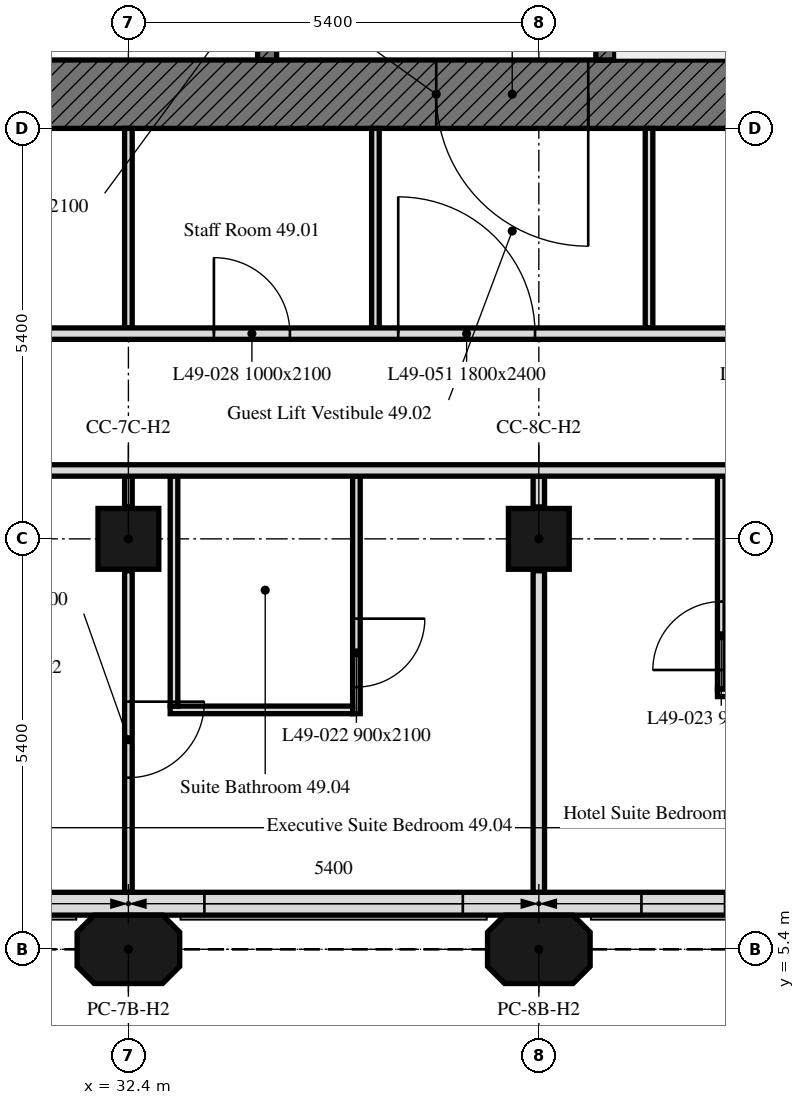
"""IFC4 building model, lengths in metres.
Left out: names, types, materials, properties, quantities, classifications, styles, units other than length and angle.
Written with IfcOpenShell. Run it as: python <this file> out.ifc"""

import sys

from ifc_helpers import new_model, si_unit, direction, frame, frame_2d, origin, origin_2d, place, context, subcontext, project, spatial, polyline, rectangle, outline, extrude, element, fill, save


model = new_model("IFC4")
c1 = context("Model", 3, precision=1e-05, world=origin(), true_north=direction((0.0, 1.0)))
c2 = subcontext(c1, "Body", "Model", "MODEL_VIEW")
j1 = project(units=[si_unit("LENGTHUNIT", "METRE"), si_unit("PLANEANGLEUNIT", "RADIAN")], contexts=[c1])
p1 = place(None, origin())
s1 = spatial("IfcSite", under=j1, at=p1, CompositionType="ELEMENT")
p2 = place(p1, origin())
s2 = spatial("IfcBuilding", under=s1, at=p2, CompositionType="ELEMENT")
p3 = place(p2, frame((0.0, 0.0, 200.5)))
s3 = spatial("IfcBuildingStorey", under=s2, at=p3, CompositionType="ELEMENT", Elevation=200.5)
for number, where, z_axis, x_axis in (
    (1, (32.4, 5.4, 0.0), (0.0, 0.0, 1.0), (1.0, 0.0, 0.0)),
    (2, (37.8, 5.4, 0.0), (0.0, 0.0, 1.0), (1.0, 0.0, 0.0)),
):
    element("IfcColumn", number, at=place(p3, frame(where, z_axis=z_axis, x_axis=x_axis)), inside=s3, PredefinedType="COLUMN", context=c2, shape_type="SweptSolid", body=[
        extrude(outline(polyline([(-0.45, -0.45), (0.45, -0.45), (0.675, -0.225), (0.675, 0.225), (0.45, 0.45), (-0.45, 0.45), (-0.675, 0.225), (-0.675, -0.225), (-0.45, -0.45)])), origin(), (0.0, 0.0, 1.0), 3.0),
    ])
for number, where, z_axis, x_axis in (
    (3, (32.4, 10.8, 0.0), (0.0, 0.0, 1.0), (1.0, 0.0, 0.0)),
    (4, (37.8, 10.8, 0.0), (0.0, 0.0, 1.0), (1.0, 0.0, 0.0)),
):
    element("IfcColumn", number, at=place(p3, frame(where, z_axis=z_axis, x_axis=x_axis)), inside=s3, PredefinedType="COLUMN", context=c2, shape_type="SweptSolid", body=[
        extrude(rectangle(XDim=0.8, YDim=0.8, at=origin_2d()), origin(), (0.0, 0.0, 1.0), 3.0),
    ])
p4 = place(p3, frame((10.986, 6.0, 0.0), z_axis=(0.0, 0.0, 1.0), x_axis=(1.0, 0.0, 0.0)))
e5 = element("IfcWall", 5, at=p4, inside=s3, PredefinedType="SOLIDWALL", context=c2, shape_type="SweptSolid", body=[
    extrude(rectangle(XDim=32.027, YDim=0.3, at=frame_2d((16.014, 0.0))), origin(), (0.0, 0.0, 1.0), 3.0),
])
p5 = place(p4, frame((0.814, 0.0, 0.9)))
e6 = element("IfcOpeningElement", 6, at=p5, cuts=e5, PredefinedType="OPENING", context=c2, shape_type="SweptSolid", body=[
    extrude(rectangle(XDim=3.4, YDim=1.7, at=frame_2d((1.7, 0.85))), frame((0.0, 0.16, 0.0), z_axis=(0.0, -1.0, 0.0), x_axis=(1.0, 0.0, 0.0)), (0.0, 0.0, 1.0), 0.32),
])
p6 = place(p4, frame((6.564, 0.0, 0.9)))
e7 = element("IfcOpeningElement", 7, at=p6, cuts=e5, PredefinedType="OPENING", context=c2, shape_type="SweptSolid", body=[
    extrude(rectangle(XDim=1.1, YDim=1.7, at=frame_2d((0.55, 0.85))), frame((0.0, 0.16, 0.0), z_axis=(0.0, -1.0, 0.0), x_axis=(1.0, 0.0, 0.0)), (0.0, 0.0, 1.0), 0.32),
])
p7 = place(p4, frame((11.614, 0.0, 0.9)))
e8 = element("IfcOpeningElement", 8, at=p7, cuts=e5, PredefinedType="OPENING", context=c2, shape_type="SweptSolid", body=[
    extrude(rectangle(XDim=3.4, YDim=1.7, at=frame_2d((1.7, 0.85))), frame((0.0, 0.16, 0.0), z_axis=(0.0, -1.0, 0.0), x_axis=(1.0, 0.0, 0.0)), (0.0, 0.0, 1.0), 0.32),
])
p8 = place(p4, frame((17.364, 0.0, 0.9)))
e9 = element("IfcOpeningElement", 9, at=p8, cuts=e5, PredefinedType="OPENING", context=c2, shape_type="SweptSolid", body=[
    extrude(rectangle(XDim=1.1, YDim=1.7, at=frame_2d((0.55, 0.85))), frame((0.0, 0.16, 0.0), z_axis=(0.0, -1.0, 0.0), x_axis=(1.0, 0.0, 0.0)), (0.0, 0.0, 1.0), 0.32),
])
p9 = place(p4, frame((22.414, 0.0, 0.9)))
e10 = element("IfcOpeningElement", 10, at=p9, cuts=e5, PredefinedType="OPENING", context=c2, shape_type="SweptSolid", body=[
    extrude(rectangle(XDim=3.4, YDim=1.7, at=frame_2d((1.7, 0.85))), frame((0.0, 0.16, 0.0), z_axis=(0.0, -1.0, 0.0), x_axis=(1.0, 0.0, 0.0)), (0.0, 0.0, 1.0), 0.32),
])
p10 = place(p4, frame((28.164, 0.0, 0.9)))
e11 = element("IfcOpeningElement", 11, at=p10, cuts=e5, PredefinedType="OPENING", context=c2, shape_type="SweptSolid", body=[
    extrude(rectangle(XDim=1.1, YDim=1.7, at=frame_2d((0.55, 0.85))), frame((0.0, 0.16, 0.0), z_axis=(0.0, -1.0, 0.0), x_axis=(1.0, 0.0, 0.0)), (0.0, 0.0, 1.0), 0.32),
])
p11 = place(p3, frame((42.0, 16.65, 0.0), z_axis=(0.0, 0.0, 1.0), x_axis=(-1.0, 0.0, 0.0)))
e12 = element("IfcWall", 12, at=p11, inside=s3, PredefinedType="SOLIDWALL", context=c2, shape_type="SweptSolid", body=[
    extrude(rectangle(XDim=11.1, YDim=0.9, at=frame_2d((5.55, 0.0))), origin(), (0.0, 0.0, 1.0), 3.0),
])
p12 = place(p11, frame((3.55, 0.0, 0.0)))
e13 = element("IfcOpeningElement", 13, at=p12, cuts=e12, PredefinedType="OPENING", context=c2, shape_type="SweptSolid", body=[
    extrude(rectangle(XDim=2.0, YDim=2.4, at=frame_2d((1.0, 1.2))), frame((0.0, 0.45, 0.0), z_axis=(0.0, -1.0, 0.0), x_axis=(1.0, 0.0, 0.0)), (0.0, 0.0, 1.0), 0.9),
])
p13 = place(p3, frame((38.675, 17.1, 0.0), z_axis=(0.0, 0.0, 1.0), x_axis=(0.0, 1.0, 0.0)))
e14 = element("IfcWall", 14, at=p13, inside=s3, PredefinedType="SOLIDWALL", context=c2, shape_type="SweptSolid", body=[
    extrude(rectangle(XDim=14.4, YDim=0.25, at=frame_2d((7.2, 0.0))), origin(), (0.0, 0.0, 1.0), 3.0),
])
p14 = place(p13, frame((4.6, 0.0, 0.0)))
e15 = element("IfcOpeningElement", 15, at=p14, cuts=e14, PredefinedType="OPENING", context=c2, shape_type="SweptSolid", body=[
    extrude(rectangle(XDim=1.0, YDim=2.1, at=frame_2d((0.5, 1.05))), frame((0.0, 0.125, 0.0), z_axis=(0.0, -1.0, 0.0), x_axis=(1.0, 0.0, 0.0)), (0.0, 0.0, 1.0), 0.25),
])
p15 = place(p13, frame((7.062, 0.0, 0.0)))
e16 = element("IfcOpeningElement", 16, at=p15, cuts=e14, PredefinedType="OPENING", context=c2, shape_type="SweptSolid", body=[
    extrude(rectangle(XDim=1.2, YDim=2.1, at=frame_2d((0.6, 1.05))), frame((0.0, 0.125, 0.0), z_axis=(0.0, -1.0, 0.0), x_axis=(1.0, 0.0, 0.0)), (0.0, 0.0, 1.0), 0.25),
])
p16 = place(p13, frame((9.472, 0.0, 0.0)))
e17 = element("IfcOpeningElement", 17, at=p16, cuts=e14, PredefinedType="OPENING", context=c2, shape_type="SweptSolid", body=[
    extrude(rectangle(XDim=0.9, YDim=2.1, at=frame_2d((0.45, 1.05))), frame((0.0, 0.125, 0.0), z_axis=(0.0, -1.0, 0.0), x_axis=(1.0, 0.0, 0.0)), (0.0, 0.0, 1.0), 0.25),
])
p17 = place(p13, frame((11.159, 0.0, 0.0)))
e18 = element("IfcOpeningElement", 18, at=p17, cuts=e14, PredefinedType="OPENING", context=c2, shape_type="SweptSolid", body=[
    extrude(rectangle(XDim=0.9, YDim=2.1, at=frame_2d((0.45, 1.05))), frame((0.0, 0.125, 0.0), z_axis=(0.0, -1.0, 0.0), x_axis=(1.0, 0.0, 0.0)), (0.0, 0.0, 1.0), 0.25),
])
p18 = place(p13, frame((13.1, 0.0, 0.0)))
e19 = element("IfcOpeningElement", 19, at=p18, cuts=e14, PredefinedType="OPENING", context=c2, shape_type="SweptSolid", body=[
    extrude(rectangle(XDim=0.9, YDim=2.1, at=frame_2d((0.45, 1.05))), frame((0.0, 0.125, 0.0), z_axis=(0.0, -1.0, 0.0), x_axis=(1.0, 0.0, 0.0)), (0.0, 0.0, 1.0), 0.25),
])
p19 = place(p3, frame((34.225, 17.1, 0.0), z_axis=(0.0, 0.0, 1.0), x_axis=(0.0, 1.0, 0.0)))
e20 = element("IfcWall", 20, at=p19, inside=s3, PredefinedType="SOLIDWALL", context=c2, shape_type="SweptSolid", body=[
    extrude(rectangle(XDim=14.4, YDim=0.25, at=frame_2d((7.2, 0.0))), origin(), (0.0, 0.0, 1.0), 3.0),
])
p20 = place(p19, frame((13.15, 0.0, 0.0)))
e21 = element("IfcOpeningElement", 21, at=p20, cuts=e20, PredefinedType="OPENING", context=c2, shape_type="SweptSolid", body=[
    extrude(rectangle(XDim=1.0, YDim=2.1, at=frame_2d((0.5, 1.05))), frame((0.0, 0.125, 0.0), z_axis=(0.0, -1.0, 0.0), x_axis=(1.0, 0.0, 0.0)), (0.0, 0.0, 1.0), 0.25),
])
p21 = place(p19, frame((0.6, 0.0, 0.0)))
e22 = element("IfcOpeningElement", 22, at=p21, cuts=e20, PredefinedType="OPENING", context=c2, shape_type="SweptSolid", body=[
    extrude(rectangle(XDim=1.1, YDim=2.1, at=frame_2d((0.55, 1.05))), frame((0.0, 0.125, 0.0), z_axis=(0.0, -1.0, 0.0), x_axis=(1.0, 0.0, 0.0)), (0.0, 0.0, 1.0), 0.25),
])
p22 = place(p19, frame((3.25, 0.0, 0.0)))
e23 = element("IfcOpeningElement", 23, at=p22, cuts=e20, PredefinedType="OPENING", context=c2, shape_type="SweptSolid", body=[
    extrude(rectangle(XDim=0.9, YDim=2.1, at=frame_2d((0.45, 1.05))), frame((0.0, 0.125, 0.0), z_axis=(0.0, -1.0, 0.0), x_axis=(1.0, 0.0, 0.0)), (0.0, 0.0, 1.0), 0.25),
])
p23 = place(p3, frame((37.8, 6.151, 0.0), z_axis=(0.0, 0.0, 1.0), x_axis=(0.0, 1.0, 0.0)))
e24 = element("IfcWall", 24, at=p23, inside=s3, PredefinedType="PARTITIONING", context=c2, shape_type="SweptSolid", body=[
    extrude(rectangle(XDim=4.229, YDim=0.15, at=frame_2d((2.115, 0.0))), origin(), (0.0, 0.0, 1.0), 3.0),
])
p24 = place(p3, frame((37.8, 11.22, 0.0), z_axis=(0.0, 0.0, 1.0), x_axis=(0.0, 1.0, 0.0)))
e25 = element("IfcWall", 25, at=p24, inside=s3, PredefinedType="PARTITIONING", context=c2, shape_type="SweptSolid", body=[
    extrude(rectangle(XDim=0.405, YDim=0.15, at=frame_2d((0.203, 0.0))), origin(), (0.0, 0.0, 1.0), 3.0),
])
p25 = place(p3, frame((35.4, 11.625, 0.0), z_axis=(0.0, 0.0, 1.0), x_axis=(0.0, -1.0, 0.0)))
e26 = element("IfcWall", 26, at=p25, inside=s3, PredefinedType="PARTITIONING", context=c2, shape_type="SweptSolid", body=[
    extrude(rectangle(XDim=3.125, YDim=0.1, at=frame_2d((1.562, 0.0))), origin(), (0.0, 0.0, 1.0), 3.0),
])
p26 = place(p25, frame((1.875, 0.0, 0.0)))
e27 = element("IfcOpeningElement", 27, at=p26, cuts=e26, PredefinedType="OPENING", context=c2, shape_type="SweptSolid", body=[
    extrude(rectangle(XDim=0.9, YDim=2.1, at=frame_2d((0.45, 1.05))), frame((0.0, 0.05, 0.0), z_axis=(0.0, -1.0, 0.0), x_axis=(1.0, 0.0, 0.0)), (0.0, 0.0, 1.0), 0.1),
])
p27 = place(p3, frame((35.35, 8.55, 0.0), z_axis=(0.0, 0.0, 1.0), x_axis=(-1.0, 0.0, 0.0)))
e28 = element("IfcWall", 28, at=p27, inside=s3, PredefinedType="PARTITIONING", context=c2, shape_type="SweptSolid", body=[
    extrude(rectangle(XDim=2.4, YDim=0.1, at=frame_2d((1.2, 0.0))), origin(), (0.0, 0.0, 1.0), 3.0),
])
p28 = place(p3, frame((33.0, 8.6, 0.0), z_axis=(0.0, 0.0, 1.0), x_axis=(0.0, 1.0, 0.0)))
e29 = element("IfcWall", 29, at=p28, inside=s3, PredefinedType="PARTITIONING", context=c2, shape_type="SweptSolid", body=[
    extrude(rectangle(XDim=3.025, YDim=0.1, at=frame_2d((1.512, 0.0))), origin(), (0.0, 0.0, 1.0), 3.0),
])
p29 = place(p3, frame((32.4, 11.625, 0.0), z_axis=(0.0, 0.0, 1.0), x_axis=(0.0, -1.0, 0.0)))
e30 = element("IfcWall", 30, at=p29, inside=s3, PredefinedType="PARTITIONING", context=c2, shape_type="SweptSolid", body=[
    extrude(rectangle(XDim=0.405, YDim=0.1, at=frame_2d((0.203, 0.0))), origin(), (0.0, 0.0, 1.0), 3.0),
])
p30 = place(p3, frame((32.4, 10.38, 0.0), z_axis=(0.0, 0.0, 1.0), x_axis=(0.0, -1.0, 0.0)))
e31 = element("IfcWall", 31, at=p30, inside=s3, PredefinedType="PARTITIONING", context=c2, shape_type="SweptSolid", body=[
    extrude(rectangle(XDim=4.229, YDim=0.1, at=frame_2d((2.115, 0.0))), origin(), (0.0, 0.0, 1.0), 3.0),
])
p31 = place(p30, frame((1.722, 0.0, 0.0)))
e32 = element("IfcOpeningElement", 32, at=p31, cuts=e31, PredefinedType="OPENING", context=c2, shape_type="SweptSolid", body=[
    extrude(rectangle(XDim=1.0, YDim=2.1, at=frame_2d((0.5, 1.05))), frame((0.0, 0.05, 0.0), z_axis=(0.0, -1.0, 0.0), x_axis=(1.0, 0.0, 0.0)), (0.0, 0.0, 1.0), 0.1),
])
p32 = place(p3, frame((42.55, 8.775, 0.0), z_axis=(0.0, 0.0, 1.0), x_axis=(-1.0, 0.0, 0.0)))
e33 = element("IfcWall", 33, at=p32, inside=s3, PredefinedType="PARTITIONING", context=c2, shape_type="SweptSolid", body=[
    extrude(rectangle(XDim=2.4, YDim=0.1, at=frame_2d((1.2, 0.0))), origin(), (0.0, 0.0, 1.0), 3.0),
])
p33 = place(p3, frame((40.2, 8.825, 0.0), z_axis=(0.0, 0.0, 1.0), x_axis=(0.0, 1.0, 0.0)))
e34 = element("IfcWall", 34, at=p33, inside=s3, PredefinedType="PARTITIONING", context=c2, shape_type="SweptSolid", body=[
    extrude(rectangle(XDim=2.8, YDim=0.1, at=frame_2d((1.4, 0.0))), origin(), (0.0, 0.0, 1.0), 3.0),
])
p34 = place(p33, frame((0.25, 0.0, 0.0)))
e35 = element("IfcOpeningElement", 35, at=p34, cuts=e34, PredefinedType="OPENING", context=c2, shape_type="SweptSolid", body=[
    extrude(rectangle(XDim=0.9, YDim=2.1, at=frame_2d((0.45, 1.05))), frame((0.0, 0.05, 0.0), z_axis=(0.0, -1.0, 0.0), x_axis=(1.0, 0.0, 0.0)), (0.0, 0.0, 1.0), 0.1),
])
p35 = place(p3, frame((6.151, 11.7, 0.0), z_axis=(0.0, 0.0, 1.0), x_axis=(1.0, 0.0, 0.0)))
e36 = element("IfcWall", 36, at=p35, inside=s3, PredefinedType="PARTITIONING", context=c2, shape_type="SweptSolid", body=[
    extrude(rectangle(XDim=41.698, YDim=0.15, at=frame_2d((20.849, 0.0))), origin(), (0.0, 0.0, 1.0), 3.0),
])
p36 = place(p35, frame((37.954, 0.0, 0.0)))
e37 = element("IfcOpeningElement", 37, at=p36, cuts=e36, PredefinedType="OPENING", context=c2, shape_type="SweptSolid", body=[
    extrude(rectangle(XDim=1.0, YDim=2.1, at=frame_2d((0.5, 1.05))), frame((0.0, 0.075, 0.0), z_axis=(0.0, -1.0, 0.0), x_axis=(1.0, 0.0, 0.0)), (0.0, 0.0, 1.0), 0.15),
])
p37 = place(p35, frame((6.849, 0.0, 0.0)))
e38 = element("IfcOpeningElement", 38, at=p37, cuts=e36, PredefinedType="OPENING", context=c2, shape_type="SweptSolid", body=[
    extrude(rectangle(XDim=1.0, YDim=2.1, at=frame_2d((0.5, 1.05))), frame((0.0, 0.075, 0.0), z_axis=(0.0, -1.0, 0.0), x_axis=(1.0, 0.0, 0.0)), (0.0, 0.0, 1.0), 0.15),
])
p38 = place(p35, frame((23.049, 0.0, 0.0)))
e39 = element("IfcOpeningElement", 39, at=p38, cuts=e36, PredefinedType="OPENING", context=c2, shape_type="SweptSolid", body=[
    extrude(rectangle(XDim=1.0, YDim=2.1, at=frame_2d((0.5, 1.05))), frame((0.0, 0.075, 0.0), z_axis=(0.0, -1.0, 0.0), x_axis=(1.0, 0.0, 0.0)), (0.0, 0.0, 1.0), 0.15),
])
for number, where, z_axis, x_axis in (
    (40, (32.4, 13.575, 0.0), (0.0, 0.0, 1.0), (0.0, 1.0, 0.0)),
    (41, (35.65, 16.2, 0.0), (0.0, 0.0, 1.0), (0.0, -1.0, 0.0)),
    (42, (39.25, 13.575, 0.0), (0.0, 0.0, 1.0), (0.0, 1.0, 0.0)),
):
    element("IfcWall", number, at=place(p3, frame(where, z_axis=z_axis, x_axis=x_axis)), inside=s3, PredefinedType="PARTITIONING", context=c2, shape_type="SweptSolid", body=[
        extrude(rectangle(XDim=2.625, YDim=0.1, at=frame_2d((1.312, 0.0))), origin(), (0.0, 0.0, 1.0), 3.0),
    ])
p39 = place(p3, frame((6.151, 13.5, 0.0), z_axis=(0.0, 0.0, 1.0), x_axis=(1.0, 0.0, 0.0)))
e43 = element("IfcWall", 43, at=p39, inside=s3, PredefinedType="PARTITIONING", context=c2, shape_type="SweptSolid", body=[
    extrude(rectangle(XDim=36.974, YDim=0.15, at=frame_2d((18.487, 0.0))), origin(), (0.0, 0.0, 1.0), 3.0),
])
p40 = place(p39, frame((12.249, 0.0, 0.0)))
e44 = element("IfcOpeningElement", 44, at=p40, cuts=e43, PredefinedType="OPENING", context=c2, shape_type="SweptSolid", body=[
    extrude(rectangle(XDim=1.0, YDim=2.1, at=frame_2d((0.5, 1.05))), frame((0.0, 0.075, 0.0), z_axis=(0.0, -1.0, 0.0), x_axis=(1.0, 0.0, 0.0)), (0.0, 0.0, 1.0), 0.15),
])
p41 = place(p39, frame((18.816, 0.0, 0.0)))
e45 = element("IfcOpeningElement", 45, at=p41, cuts=e43, PredefinedType="OPENING", context=c2, shape_type="SweptSolid", body=[
    extrude(rectangle(XDim=1.0, YDim=2.1, at=frame_2d((0.5, 1.05))), frame((0.0, 0.075, 0.0), z_axis=(0.0, -1.0, 0.0), x_axis=(1.0, 0.0, 0.0)), (0.0, 0.0, 1.0), 0.15),
])
p42 = place(p39, frame((2.029, 0.0, 0.0)))
e46 = element("IfcOpeningElement", 46, at=p42, cuts=e43, PredefinedType="OPENING", context=c2, shape_type="SweptSolid", body=[
    extrude(rectangle(XDim=1.0, YDim=2.1, at=frame_2d((0.5, 1.05))), frame((0.0, 0.075, 0.0), z_axis=(0.0, -1.0, 0.0), x_axis=(1.0, 0.0, 0.0)), (0.0, 0.0, 1.0), 0.15),
])
p43 = place(p39, frame((27.374, 0.0, 0.0)))
e47 = element("IfcOpeningElement", 47, at=p43, cuts=e43, PredefinedType="OPENING", context=c2, shape_type="SweptSolid", body=[
    extrude(rectangle(XDim=1.0, YDim=2.1, at=frame_2d((0.5, 1.05))), frame((0.0, 0.075, 0.0), z_axis=(0.0, -1.0, 0.0), x_axis=(1.0, 0.0, 0.0)), (0.0, 0.0, 1.0), 0.15),
])
p44 = place(p39, frame((34.574, 0.0, 0.0)))
e48 = element("IfcOpeningElement", 48, at=p44, cuts=e43, PredefinedType="OPENING", context=c2, shape_type="SweptSolid", body=[
    extrude(rectangle(XDim=1.0, YDim=2.1, at=frame_2d((0.5, 1.05))), frame((0.0, 0.075, 0.0), z_axis=(0.0, -1.0, 0.0), x_axis=(1.0, 0.0, 0.0)), (0.0, 0.0, 1.0), 0.15),
])
p45 = place(p39, frame((7.924, 0.0, 0.0)))
e49 = element("IfcOpeningElement", 49, at=p45, cuts=e43, PredefinedType="OPENING", context=c2, shape_type="SweptSolid", body=[
    extrude(rectangle(XDim=1.0, YDim=2.1, at=frame_2d((0.5, 1.05))), frame((0.0, 0.075, 0.0), z_axis=(0.0, -1.0, 0.0), x_axis=(1.0, 0.0, 0.0)), (0.0, 0.0, 1.0), 0.15),
])
p46 = place(p39, frame((4.699, 0.0, 0.0)))
e50 = element("IfcOpeningElement", 50, at=p46, cuts=e43, PredefinedType="OPENING", context=c2, shape_type="SweptSolid", body=[
    extrude(rectangle(XDim=1.8, YDim=2.4, at=frame_2d((0.9, 1.2))), frame((0.0, 0.075, 0.0), z_axis=(0.0, -1.0, 0.0), x_axis=(1.0, 0.0, 0.0)), (0.0, 0.0, 1.0), 0.15),
])
p47 = place(p39, frame((29.799, 0.0, 0.0)))
e51 = element("IfcOpeningElement", 51, at=p47, cuts=e43, PredefinedType="OPENING", context=c2, shape_type="SweptSolid", body=[
    extrude(rectangle(XDim=1.8, YDim=2.4, at=frame_2d((0.9, 1.2))), frame((0.0, 0.075, 0.0), z_axis=(0.0, -1.0, 0.0), x_axis=(1.0, 0.0, 0.0)), (0.0, 0.0, 1.0), 0.15),
])
p48 = place(p9, origin())
e52 = element("IfcWindow", 52, at=p48, inside=s3, PartitioningType="SINGLE_PANEL", PredefinedType="WINDOW", context=c2, shape_type="SweptSolid", body=[
    extrude(rectangle(XDim=3.4, YDim=1.7, at=frame_2d((1.7, 0.85))), frame((0.0, 0.03, 0.0), z_axis=(0.0, -1.0, 0.0), x_axis=(1.0, 0.0, 0.0)), (0.0, 0.0, 1.0), 0.06),
])
fill(e10, e52)
p49 = place(p10, origin())
e53 = element("IfcWindow", 53, at=p49, inside=s3, PartitioningType="SINGLE_PANEL", PredefinedType="WINDOW", context=c2, shape_type="SweptSolid", body=[
    extrude(rectangle(XDim=1.1, YDim=1.7, at=frame_2d((0.55, 0.85))), frame((0.0, 0.03, 0.0), z_axis=(0.0, -1.0, 0.0), x_axis=(1.0, 0.0, 0.0)), (0.0, 0.0, 1.0), 0.06),
])
fill(e11, e53)
p50 = place(p12, origin())
e54 = element("IfcDoor", 54, at=p50, inside=s3, OperationType="DOUBLE_DOOR_SINGLE_SWING", PredefinedType="DOOR", context=c2, shape_type="SweptSolid", body=[
    extrude(rectangle(XDim=2.0, YDim=2.4, at=frame_2d((1.0, 1.2))), frame((0.0, 0.025, 0.0), z_axis=(0.0, -1.0, 0.0), x_axis=(1.0, 0.0, 0.0)), (0.0, 0.0, 1.0), 0.05),
])
fill(e13, e54)
p51 = place(p26, origin())
e55 = element("IfcDoor", 55, at=p51, inside=s3, OperationType="SINGLE_SWING_RIGHT", PredefinedType="DOOR", context=c2, shape_type="SweptSolid", body=[
    extrude(rectangle(XDim=0.9, YDim=2.1, at=frame_2d((0.45, 1.05))), frame((0.0, 0.025, 0.0), z_axis=(0.0, -1.0, 0.0), x_axis=(1.0, 0.0, 0.0)), (0.0, 0.0, 1.0), 0.05),
])
fill(e27, e55)
p52 = place(p34, origin())
e56 = element("IfcDoor", 56, at=p52, inside=s3, OperationType="SINGLE_SWING_RIGHT", PredefinedType="DOOR", context=c2, shape_type="SweptSolid", body=[
    extrude(rectangle(XDim=0.9, YDim=2.1, at=frame_2d((0.45, 1.05))), frame((0.0, 0.025, 0.0), z_axis=(0.0, -1.0, 0.0), x_axis=(1.0, 0.0, 0.0)), (0.0, 0.0, 1.0), 0.05),
])
fill(e35, e56)
p53 = place(p43, origin())
e57 = element("IfcDoor", 57, at=p53, inside=s3, OperationType="SINGLE_SWING_LEFT", PredefinedType="DOOR", context=c2, shape_type="SweptSolid", body=[
    extrude(rectangle(XDim=1.0, YDim=2.1, at=frame_2d((0.5, 1.05))), frame((0.0, 0.025, 0.0), z_axis=(0.0, -1.0, 0.0), x_axis=(1.0, 0.0, 0.0)), (0.0, 0.0, 1.0), 0.05),
])
fill(e47, e57)
p54 = place(p31, origin())
e58 = element("IfcDoor", 58, at=p54, inside=s3, OperationType="SINGLE_SWING_LEFT", PredefinedType="DOOR", context=c2, shape_type="SweptSolid", body=[
    extrude(rectangle(XDim=1.0, YDim=2.1, at=frame_2d((0.5, 1.05))), frame((0.0, 0.025, 0.0), z_axis=(0.0, -1.0, 0.0), x_axis=(1.0, 0.0, 0.0)), (0.0, 0.0, 1.0), 0.05),
])
fill(e32, e58)
p55 = place(p47, origin())
e59 = element("IfcDoor", 59, at=p55, inside=s3, OperationType="DOUBLE_DOOR_SINGLE_SWING", PredefinedType="DOOR", context=c2, shape_type="SweptSolid", body=[
    extrude(rectangle(XDim=1.8, YDim=2.4, at=frame_2d((0.9, 1.2))), frame((0.0, 0.025, 0.0), z_axis=(0.0, -1.0, 0.0), x_axis=(1.0, 0.0, 0.0)), (0.0, 0.0, 1.0), 0.05),
])
fill(e51, e59)
save(model, sys.argv[1])
